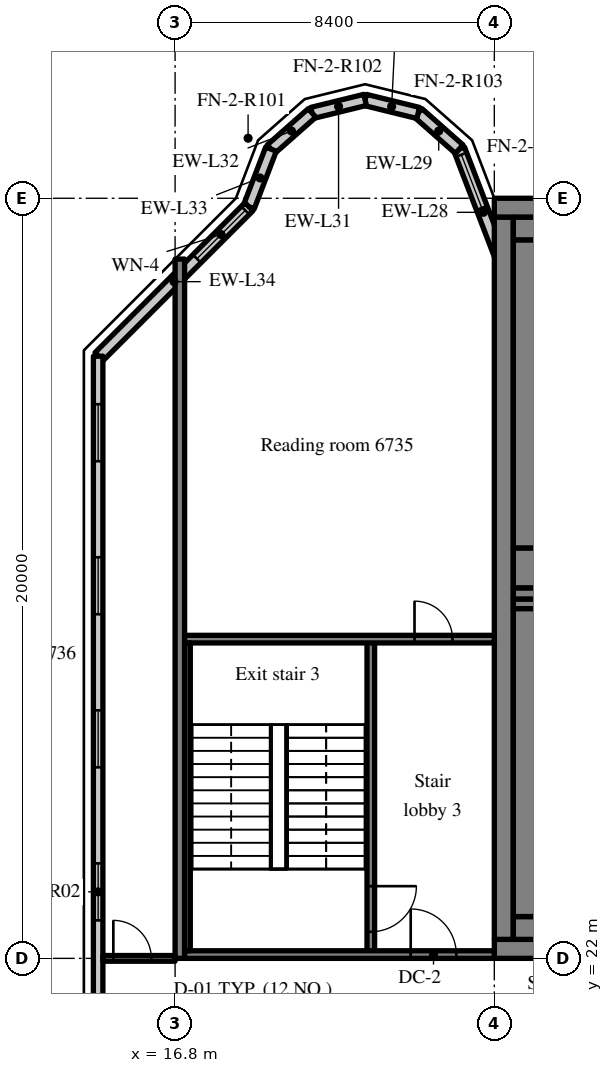
"""IFC4 building model, lengths in metres.
Left out: names, types, materials, properties, quantities, classifications, styles, units other than length and angle.
Written with IfcOpenShell. Run it as: python <this file> out.ifc"""

import sys

from ifc_helpers import new_model, si_unit, direction, frame, frame_2d, origin, place, context, subcontext, project, spatial, rectangle, extrude, source, transform, mapped, element, fill, save


model = new_model("IFC4")
c1 = context("Model", 3, precision=1e-05, world=origin(), true_north=direction((0.0, 1.0)))
c2 = subcontext(c1, "Body", "Model", "MODEL_VIEW")
j1 = project(units=[si_unit("LENGTHUNIT", "METRE"), si_unit("PLANEANGLEUNIT", "RADIAN")], contexts=[c1])
p1 = place(None, origin())
s1 = spatial("IfcSite", under=j1, at=p1, CompositionType="ELEMENT")
p2 = place(p1, origin())
s2 = spatial("IfcBuilding", under=s1, at=p2, CompositionType="ELEMENT")
p3 = place(p2, frame((0.0, 0.0, 281.7)))
s3 = spatial("IfcBuildingStorey", under=s2, at=p3, CompositionType="ELEMENT", Elevation=281.7)
m1 = source(origin(), c2, "Body", "SweptSolid", [
    extrude(rectangle(XDim=50.4, YDim=0.5, at=frame_2d((25.2, 0.0))), origin(), (0.0, 0.0, 1.0), 3.72),
])
p4 = place(p3, frame((25.2, 22.25, 0.0), z_axis=(0.0, 0.0, 1.0), x_axis=(1.0, 0.0, 0.0)))
e1 = element("IfcWall", 1, at=p4, inside=s3, PredefinedType="SHEAR", context=c2, shape_type="MappedRepresentation", body=[
    mapped(m1, transform((0.0, 0.0, 0.0), scale=1.0)),
])
m2 = source(origin(), c2, "Body", "SweptSolid", [
    extrude(rectangle(XDim=1.8, YDim=2.1, at=frame_2d((0.9, 1.05))), frame((0.0, 0.26, 0.0), z_axis=(0.0, -1.0, 0.0), x_axis=(1.0, 0.0, 0.0)), (0.0, 0.0, 1.0), 0.52),
])
p5 = place(p4, frame((15.9, 0.0, 0.0)))
e2 = element("IfcOpeningElement", 2, at=p5, cuts=e1, PredefinedType="OPENING", context=c2, shape_type="MappedRepresentation", body=[
    mapped(m2, transform((0.0, 0.0, 0.0), scale=1.0)),
])
m3 = source(origin(), c2, "Body", "SweptSolid", [
    extrude(rectangle(XDim=0.9, YDim=2.1, at=frame_2d((0.45, 1.05))), frame((0.0, 0.26, 0.0), z_axis=(0.0, -1.0, 0.0), x_axis=(1.0, 0.0, 0.0)), (0.0, 0.0, 1.0), 0.52),
])
p6 = place(p4, frame((21.525, 0.0, 0.0)))
e3 = element("IfcOpeningElement", 3, at=p6, cuts=e1, PredefinedType="OPENING", context=c2, shape_type="MappedRepresentation", body=[
    mapped(m3, transform((0.0, 0.0, 0.0), scale=1.0)),
])
p7 = place(p4, frame((32.7, 0.0, 0.0)))
e4 = element("IfcOpeningElement", 4, at=p7, cuts=e1, PredefinedType="OPENING", context=c2, shape_type="MappedRepresentation", body=[
    mapped(m2, transform((0.0, 0.0, 0.0), scale=1.0)),
])
m4 = source(origin(), c2, "Body", "SweptSolid", [
    extrude(rectangle(XDim=1.2, YDim=2.1, at=frame_2d((0.6, 1.05))), frame((0.0, 0.26, 0.0), z_axis=(0.0, -1.0, 0.0), x_axis=(1.0, 0.0, 0.0)), (0.0, 0.0, 1.0), 0.52),
])
p8 = place(p4, frame((6.5, 0.0, 0.0)))
e5 = element("IfcOpeningElement", 5, at=p8, cuts=e1, PredefinedType="OPENING", context=c2, shape_type="MappedRepresentation", body=[
    mapped(m4, transform((0.0, 0.0, 0.0), scale=1.0)),
])
p9 = place(p4, frame((47.975, 0.0, 0.0)))
e6 = element("IfcOpeningElement", 6, at=p9, cuts=e1, PredefinedType="OPENING", context=c2, shape_type="MappedRepresentation", body=[
    mapped(m4, transform((0.0, 0.0, 0.0), scale=1.0)),
])
p10 = place(p3, frame((25.2, 41.75, 0.0), z_axis=(0.0, 0.0, 1.0), x_axis=(1.0, 0.0, 0.0)))
e7 = element("IfcWall", 7, at=p10, inside=s3, PredefinedType="SHEAR", context=c2, shape_type="MappedRepresentation", body=[
    mapped(m1, transform((0.0, 0.0, 0.0), scale=1.0)),
])
m5 = source(origin(), c2, "Body", "SweptSolid", [
    extrude(rectangle(XDim=19.0, YDim=0.5, at=frame_2d((9.5, 0.0))), origin(), (0.0, 0.0, 1.0), 3.72),
])
p11 = place(p3, frame((25.45, 22.5, 0.0), z_axis=(0.0, 0.0, 1.0), x_axis=(0.0, 1.0, 0.0)))
e8 = element("IfcWall", 8, at=p11, inside=s3, PredefinedType="SHEAR", context=c2, shape_type="MappedRepresentation", body=[
    mapped(m5, transform((0.0, 0.0, 0.0), scale=1.0)),
])
m6 = source(origin(), c2, "Body", "SweptSolid", [
    extrude(rectangle(XDim=7.75, YDim=0.3, at=frame_2d((3.875, 0.0))), origin(), (0.0, 0.0, 1.0), 3.72),
])
p12 = place(p3, frame((25.7, 31.6, 0.0), z_axis=(0.0, 0.0, 1.0), x_axis=(1.0, 0.0, 0.0)))
e9 = element("IfcWall", 9, at=p12, inside=s3, PredefinedType="SHEAR", context=c2, shape_type="MappedRepresentation", body=[
    mapped(m6, transform((0.0, 0.0, 0.0), scale=1.0)),
])
m7 = source(origin(), c2, "Body", "SweptSolid", [
    extrude(rectangle(XDim=1.1, YDim=2.1, at=frame_2d((0.55, 1.05))), frame((0.0, 0.16, 0.0), z_axis=(0.0, -1.0, 0.0), x_axis=(1.0, 0.0, 0.0)), (0.0, 0.0, 1.0), 0.32),
])
p13 = place(p12, frame((6.05, 0.0, 0.0)))
e10 = element("IfcOpeningElement", 10, at=p13, cuts=e9, PredefinedType="OPENING", context=c2, shape_type="MappedRepresentation", body=[
    mapped(m7, transform((0.0, 0.0, 0.0), scale=1.0)),
])
m8 = source(origin(), c2, "Body", "SweptSolid", [
    extrude(rectangle(XDim=18.4, YDim=0.25, at=frame_2d((9.2, 0.0))), origin(), (0.0, 0.0, 1.0), 3.72),
])
p14 = place(p3, frame((16.925, 22.0, 0.0), z_axis=(0.0, 0.0, 1.0), x_axis=(0.0, 1.0, 0.0)))
e11 = element("IfcWall", 11, at=p14, inside=s3, PredefinedType="SHEAR", context=c2, shape_type="MappedRepresentation", body=[
    mapped(m8, transform((0.0, 0.0, 0.0), scale=1.0)),
])
m9 = source(origin(), c2, "Body", "SweptSolid", [
    extrude(rectangle(XDim=3.559, YDim=0.3, at=frame_2d((1.78, 0.0))), origin(), (0.0, 0.0, 1.0), 3.72),
])
p15 = place(p3, frame((25.55, 39.969, 0.0), z_axis=(0.0, 0.0, 1.0), x_axis=(-0.35779745313, 0.933799219604, 0.0)))
e12 = element("IfcWall", 12, at=p15, inside=s3, PredefinedType="SOLIDWALL", context=c2, shape_type="MappedRepresentation", body=[
    mapped(m9, transform((0.0, 0.0, 0.0), scale=1.0)),
])
m10 = source(origin(), c2, "Body", "SweptSolid", [
    extrude(rectangle(XDim=1.5, YDim=2.0, at=frame_2d((0.75, 1.0))), frame((0.0, 0.16, 0.0), z_axis=(0.0, -1.0, 0.0), x_axis=(1.0, 0.0, 0.0)), (0.0, 0.0, 1.0), 0.32),
])
p16 = place(p15, frame((1.903, 0.0, 0.9)))
e13 = element("IfcOpeningElement", 13, at=p16, cuts=e12, PredefinedType="OPENING", context=c2, shape_type="MappedRepresentation", body=[
    mapped(m10, transform((0.0, 0.0, 0.0), scale=1.0)),
])
m11 = source(origin(), c2, "Body", "SweptSolid", [
    extrude(rectangle(XDim=1.44, YDim=0.3, at=frame_2d((0.72, 0.0))), origin(), (0.0, 0.0, 1.0), 3.72),
])
p17 = place(p3, frame((24.277, 43.292, 0.0), z_axis=(0.0, 0.0, 1.0), x_axis=(-0.749649827867, 0.661834673902, 0.0)))
e14 = element("IfcWall", 14, at=p17, inside=s3, PredefinedType="SOLIDWALL", context=c2, shape_type="MappedRepresentation", body=[
    mapped(m11, transform((0.0, 0.0, 0.0), scale=1.0)),
])
m12 = source(origin(), c2, "Body", "SweptSolid", [
    extrude(rectangle(XDim=1.438, YDim=0.3, at=frame_2d((0.719, 0.0))), origin(), (0.0, 0.0, 1.0), 3.72),
])
p18 = place(p3, frame((23.197, 44.245, 0.0), z_axis=(0.0, 0.0, 1.0), x_axis=(-0.971152283879, 0.238460146601, 0.0)))
e15 = element("IfcWall", 15, at=p18, inside=s3, PredefinedType="SOLIDWALL", context=c2, shape_type="MappedRepresentation", body=[
    mapped(m12, transform((0.0, 0.0, 0.0), scale=1.0)),
])
m13 = source(origin(), c2, "Body", "SweptSolid", [
    extrude(rectangle(XDim=1.439, YDim=0.3, at=frame_2d((0.719, 0.0))), origin(), (0.0, 0.0, 1.0), 3.72),
])
p19 = place(p3, frame((21.8, 44.588, 0.0), z_axis=(0.0, 0.0, 1.0), x_axis=(-0.971161932466, -0.238420848351, 0.0)))
e16 = element("IfcWall", 16, at=p19, inside=s3, PredefinedType="SOLIDWALL", context=c2, shape_type="MappedRepresentation", body=[
    mapped(m13, transform((0.0, 0.0, 0.0), scale=1.0)),
])
m14 = source(origin(), c2, "Body", "SweptSolid", [
    extrude(rectangle(XDim=1.44, YDim=0.3, at=frame_2d((0.72, 0.0))), origin(), (0.0, 0.0, 1.0), 3.72),
])
p20 = place(p3, frame((20.403, 44.245, 0.0), z_axis=(0.0, 0.0, 1.0), x_axis=(-0.74957555648, -0.661918790432, 0.0)))
e17 = element("IfcWall", 17, at=p20, inside=s3, PredefinedType="SOLIDWALL", context=c2, shape_type="MappedRepresentation", body=[
    mapped(m14, transform((0.0, 0.0, 0.0), scale=1.0)),
])
m15 = source(origin(), c2, "Body", "SweptSolid", [
    extrude(rectangle(XDim=1.622, YDim=0.3, at=frame_2d((0.811, 0.0))), origin(), (0.0, 0.0, 1.0), 3.72),
])
p21 = place(p3, frame((19.323, 43.292, 0.0), z_axis=(0.0, 0.0, 1.0), x_axis=(-0.357778527068, -0.933806471154, 0.0)))
e18 = element("IfcWall", 18, at=p21, inside=s3, PredefinedType="SOLIDWALL", context=c2, shape_type="MappedRepresentation", body=[
    mapped(m15, transform((0.0, 0.0, 0.0), scale=1.0)),
])
m16 = source(origin(), c2, "Body", "SweptSolid", [
    extrude(rectangle(XDim=5.576, YDim=0.3, at=frame_2d((2.788, 0.0))), origin(), (0.0, 0.0, 1.0), 3.72),
])
p22 = place(p3, frame((18.743, 41.777, 0.0), z_axis=(0.0, 0.0, 1.0), x_axis=(-0.707106781187, -0.707106781187, 0.0)))
e19 = element("IfcWall", 19, at=p22, inside=s3, PredefinedType="SOLIDWALL", context=c2, shape_type="MappedRepresentation", body=[
    mapped(m16, transform((0.0, 0.0, 0.0), scale=1.0)),
])
m17 = source(origin(), c2, "Body", "SweptSolid", [
    extrude(rectangle(XDim=1.8, YDim=1.5, at=frame_2d((0.9, 0.75))), frame((0.0, 0.16, 0.0), z_axis=(0.0, -1.0, 0.0), x_axis=(1.0, 0.0, 0.0)), (0.0, 0.0, 1.0), 0.32),
])
p23 = place(p22, frame((0.135, 0.0, 0.9)))
e20 = element("IfcOpeningElement", 20, at=p23, cuts=e19, PredefinedType="OPENING", context=c2, shape_type="MappedRepresentation", body=[
    mapped(m17, transform((0.0, 0.0, 0.0), scale=1.0)),
])
m18 = source(origin(), c2, "Body", "SweptSolid", [
    extrude(rectangle(XDim=28.189, YDim=0.25, at=frame_2d((14.095, 0.0))), origin(), (0.0, 0.0, 1.0), 3.72),
])
p24 = place(p3, frame((14.775, 37.845, 0.0), z_axis=(0.0, 0.0, 1.0), x_axis=(0.0, -1.0, 0.0)))
e21 = element("IfcWall", 21, at=p24, inside=s3, PredefinedType="SOLIDWALL", context=c2, shape_type="MappedRepresentation", body=[
    mapped(m18, transform((0.0, 0.0, 0.0), scale=1.0)),
])
m19 = source(origin(), c2, "Body", "SweptSolid", [
    extrude(rectangle(XDim=1.5, YDim=1.5, at=frame_2d((0.75, 0.75))), frame((0.0, 0.135, 0.0), z_axis=(0.0, -1.0, 0.0), x_axis=(1.0, 0.0, 0.0)), (0.0, 0.0, 1.0), 0.27),
])
p25 = place(p24, frame((1.263, 0.0, 0.9)))
e22 = element("IfcOpeningElement", 22, at=p25, cuts=e21, PredefinedType="OPENING", context=c2, shape_type="MappedRepresentation", body=[
    mapped(m19, transform((0.0, 0.0, 0.0), scale=1.0)),
])
p26 = place(p24, frame((5.291, 0.0, 0.9)))
e23 = element("IfcOpeningElement", 23, at=p26, cuts=e21, PredefinedType="OPENING", context=c2, shape_type="MappedRepresentation", body=[
    mapped(m19, transform((0.0, 0.0, 0.0), scale=1.0)),
])
p27 = place(p24, frame((9.318, 0.0, 0.9)))
e24 = element("IfcOpeningElement", 24, at=p27, cuts=e21, PredefinedType="OPENING", context=c2, shape_type="MappedRepresentation", body=[
    mapped(m19, transform((0.0, 0.0, 0.0), scale=1.0)),
])
p28 = place(p24, frame((13.345, 0.0, 0.9)))
e25 = element("IfcOpeningElement", 25, at=p28, cuts=e21, PredefinedType="OPENING", context=c2, shape_type="MappedRepresentation", body=[
    mapped(m19, transform((0.0, 0.0, 0.0), scale=1.0)),
])
p29 = place(p24, frame((17.372, 0.0, 0.9)))
e26 = element("IfcOpeningElement", 26, at=p29, cuts=e21, PredefinedType="OPENING", context=c2, shape_type="MappedRepresentation", body=[
    mapped(m19, transform((0.0, 0.0, 0.0), scale=1.0)),
])
p30 = place(p24, frame((21.399, 0.0, 0.9)))
e27 = element("IfcOpeningElement", 27, at=p30, cuts=e21, PredefinedType="OPENING", context=c2, shape_type="MappedRepresentation", body=[
    mapped(m19, transform((0.0, 0.0, 0.0), scale=1.0)),
])
p31 = place(p24, frame((25.426, 0.0, 0.9)))
e28 = element("IfcOpeningElement", 28, at=p31, cuts=e21, PredefinedType="OPENING", context=c2, shape_type="MappedRepresentation", body=[
    mapped(m19, transform((0.0, 0.0, 0.0), scale=1.0)),
])
m20 = source(origin(), c2, "Body", "SweptSolid", [
    extrude(rectangle(XDim=8.3, YDim=0.2, at=frame_2d((4.15, 0.0))), origin(), (0.0, 0.0, 1.0), 3.72),
])
p32 = place(p3, frame((21.95, 22.1, 0.0), z_axis=(0.0, 0.0, 1.0), x_axis=(0.0, 1.0, 0.0)))
e29 = element("IfcWall", 29, at=p32, inside=s3, PredefinedType="SOLIDWALL", context=c2, shape_type="MappedRepresentation", body=[
    mapped(m20, transform((0.0, 0.0, 0.0), scale=1.0)),
])
m21 = source(origin(), c2, "Body", "SweptSolid", [
    extrude(rectangle(XDim=1.2, YDim=2.1, at=frame_2d((0.6, 1.05))), frame((0.0, 0.11, 0.0), z_axis=(0.0, -1.0, 0.0), x_axis=(1.0, 0.0, 0.0)), (0.0, 0.0, 1.0), 0.22),
])
p33 = place(p32, frame((0.6, 0.0, 0.0)))
e30 = element("IfcOpeningElement", 30, at=p33, cuts=e29, PredefinedType="OPENING", context=c2, shape_type="MappedRepresentation", body=[
    mapped(m21, transform((0.0, 0.0, 0.0), scale=1.0)),
])
m22 = source(origin(), c2, "Body", "SweptSolid", [
    extrude(rectangle(XDim=8.15, YDim=0.2, at=frame_2d((4.075, 0.0))), origin(), (0.0, 0.0, 1.0), 3.72),
])
p34 = place(p3, frame((17.05, 22.1, 0.0), z_axis=(0.0, 0.0, 1.0), x_axis=(1.0, 0.0, 0.0)))
e31 = element("IfcWall", 31, at=p34, inside=s3, PredefinedType="SOLIDWALL", context=c2, shape_type="MappedRepresentation", body=[
    mapped(m22, transform((0.0, 0.0, 0.0), scale=1.0)),
])
p35 = place(p34, frame((5.95, 0.0, 0.0)))
e32 = element("IfcOpeningElement", 32, at=p35, cuts=e31, PredefinedType="OPENING", context=c2, shape_type="MappedRepresentation", body=[
    mapped(m21, transform((0.0, 0.0, 0.0), scale=1.0)),
])
p36 = place(p3, frame((17.05, 30.4, 0.0), z_axis=(0.0, 0.0, 1.0), x_axis=(1.0, 0.0, 0.0)))
e33 = element("IfcWall", 33, at=p36, inside=s3, PredefinedType="SOLIDWALL", context=c2, shape_type="MappedRepresentation", body=[
    mapped(m22, transform((0.0, 0.0, 0.0), scale=1.0)),
])
m23 = source(origin(), c2, "Body", "SweptSolid", [
    extrude(rectangle(XDim=1.0, YDim=2.1, at=frame_2d((0.5, 1.05))), frame((0.0, 0.11, 0.0), z_axis=(0.0, -1.0, 0.0), x_axis=(1.0, 0.0, 0.0)), (0.0, 0.0, 1.0), 0.22),
])
p37 = place(p36, frame((6.05, 0.0, 0.0)))
e34 = element("IfcOpeningElement", 34, at=p37, cuts=e33, PredefinedType="OPENING", context=c2, shape_type="MappedRepresentation", body=[
    mapped(m23, transform((0.0, 0.0, 0.0), scale=1.0)),
])
m24 = source(origin(), c2, "Body", "SweptSolid", [
    extrude(rectangle(XDim=5.25, YDim=0.6, at=frame_2d((2.625, 0.0))), origin(), (0.0, 0.0, 1.0), 3.72),
])
p38 = place(p3, frame((25.7, 22.8, 0.0), z_axis=(0.0, 0.0, 1.0), x_axis=(1.0, 0.0, 0.0)))
e35 = element("IfcWall", 35, at=p38, inside=s3, PredefinedType="SOLIDWALL", context=c2, shape_type="MappedRepresentation", body=[
    mapped(m24, transform((0.0, 0.0, 0.0), scale=1.0)),
])
m25 = source(origin(), c2, "Body", "SweptSolid", [
    extrude(rectangle(XDim=5.25, YDim=0.25, at=frame_2d((2.625, 0.0))), origin(), (0.0, 0.0, 1.0), 3.72),
])
p39 = place(p3, frame((25.7, 31.325, 0.0), z_axis=(0.0, 0.0, 1.0), x_axis=(1.0, 0.0, 0.0)))
e36 = element("IfcWall", 36, at=p39, inside=s3, PredefinedType="SOLIDWALL", context=c2, shape_type="MappedRepresentation", body=[
    mapped(m25, transform((0.0, 0.0, 0.0), scale=1.0)),
])
m26 = source(origin(), c2, "Body", "SweptSolid", [
    extrude(rectangle(XDim=8.1, YDim=0.6, at=frame_2d((4.05, 0.0))), origin(), (0.0, 0.0, 1.0), 3.72),
])
p40 = place(p3, frame((26.0, 23.1, 0.0), z_axis=(0.0, 0.0, 1.0), x_axis=(0.0, 1.0, 0.0)))
e37 = element("IfcWall", 37, at=p40, inside=s3, PredefinedType="SOLIDWALL", context=c2, shape_type="MappedRepresentation", body=[
    mapped(m26, transform((0.0, 0.0, 0.0), scale=1.0)),
])
m27 = source(origin(), c2, "Body", "SweptSolid", [
    extrude(rectangle(XDim=8.1, YDim=0.15, at=frame_2d((4.05, 0.0))), origin(), (0.0, 0.0, 1.0), 3.72),
])
p41 = place(p3, frame((17.125, 22.2, 0.0), z_axis=(0.0, 0.0, 1.0), x_axis=(0.0, 1.0, 0.0)))
e38 = element("IfcWall", 38, at=p41, inside=s3, PredefinedType="SOLIDWALL", context=c2, shape_type="MappedRepresentation", body=[
    mapped(m27, transform((0.0, 0.0, 0.0), scale=1.0)),
])
p42 = place(p3, frame((25.7, 41.2, 0.0), z_axis=(0.0, 0.0, 1.0), x_axis=(1.0, 0.0, 0.0)))
e39 = element("IfcWall", 39, at=p42, inside=s3, PredefinedType="SOLIDWALL", context=c2, shape_type="MappedRepresentation", body=[
    mapped(m24, transform((0.0, 0.0, 0.0), scale=1.0)),
])
m28 = source(origin(), c2, "Body", "SweptSolid", [
    extrude(rectangle(XDim=5.25, YDim=1.05, at=frame_2d((2.625, 0.0))), origin(), (0.0, 0.0, 1.0), 3.72),
])
p43 = place(p3, frame((25.7, 32.275, 0.0), z_axis=(0.0, 0.0, 1.0), x_axis=(1.0, 0.0, 0.0)))
e40 = element("IfcWall", 40, at=p43, inside=s3, PredefinedType="SOLIDWALL", context=c2, shape_type="MappedRepresentation", body=[
    mapped(m28, transform((0.0, 0.0, 0.0), scale=1.0)),
])
p44 = place(p3, frame((26.0, 32.8, 0.0), z_axis=(0.0, 0.0, 1.0), x_axis=(0.0, 1.0, 0.0)))
e41 = element("IfcWall", 41, at=p44, inside=s3, PredefinedType="SOLIDWALL", context=c2, shape_type="MappedRepresentation", body=[
    mapped(m26, transform((0.0, 0.0, 0.0), scale=1.0)),
])
m29 = source(origin(), c2, "Body", "SweptSolid", [
    extrude(rectangle(XDim=1.9, YDim=0.15, at=frame_2d((0.95, 0.0))), origin(), (0.0, 0.0, 1.0), 3.02),
])
p45 = place(p3, frame((14.9, 22.0, 0.0), z_axis=(0.0, 0.0, 1.0), x_axis=(1.0, 0.0, 0.0)))
e42 = element("IfcWall", 42, at=p45, inside=s3, PredefinedType="PARTITIONING", context=c2, shape_type="MappedRepresentation", body=[
    mapped(m29, transform((0.0, 0.0, 0.0), scale=1.0)),
])
m30 = source(origin(), c2, "Body", "SweptSolid", [
    extrude(rectangle(XDim=1.0, YDim=2.1, at=frame_2d((0.5, 1.05))), frame((0.0, 0.085, 0.0), z_axis=(0.0, -1.0, 0.0), x_axis=(1.0, 0.0, 0.0)), (0.0, 0.0, 1.0), 0.17),
])
p46 = place(p45, frame((0.275, 0.0, 0.0)))
e43 = element("IfcOpeningElement", 43, at=p46, cuts=e42, PredefinedType="OPENING", context=c2, shape_type="MappedRepresentation", body=[
    mapped(m30, transform((0.0, 0.0, 0.0), scale=1.0)),
])
m31 = source(origin(), c2, "Body", "SweptSolid", [
    extrude(rectangle(XDim=1.5, YDim=2.0, at=frame_2d((0.75, 1.0))), frame((0.0, 0.03, 0.0), z_axis=(0.0, -1.0, 0.0), x_axis=(1.0, 0.0, 0.0)), (0.0, 0.0, 1.0), 0.06),
])
p47 = place(p16, origin())
e44 = element("IfcWindow", 44, at=p47, inside=s3, PartitioningType="SINGLE_PANEL", PredefinedType="WINDOW", context=c2, shape_type="MappedRepresentation", body=[
    mapped(m31, transform((0.0, 0.0, 0.0), scale=1.0)),
])
fill(e13, e44)
m32 = source(origin(), c2, "Body", "SweptSolid", [
    extrude(rectangle(XDim=1.8, YDim=1.5, at=frame_2d((0.9, 0.75))), frame((0.0, 0.03, 0.0), z_axis=(0.0, -1.0, 0.0), x_axis=(1.0, 0.0, 0.0)), (0.0, 0.0, 1.0), 0.06),
])
p48 = place(p23, origin())
e45 = element("IfcWindow", 45, at=p48, inside=s3, PartitioningType="SINGLE_PANEL", PredefinedType="WINDOW", context=c2, shape_type="MappedRepresentation", body=[
    mapped(m32, transform((0.0, 0.0, 0.0), scale=1.0)),
])
fill(e20, e45)
m33 = source(origin(), c2, "Body", "SweptSolid", [
    extrude(rectangle(XDim=1.5, YDim=1.5, at=frame_2d((0.75, 0.75))), frame((0.0, 0.03, 0.0), z_axis=(0.0, -1.0, 0.0), x_axis=(1.0, 0.0, 0.0)), (0.0, 0.0, 1.0), 0.06),
])
p49 = place(p25, origin())
e46 = element("IfcWindow", 46, at=p49, inside=s3, PartitioningType="SINGLE_PANEL", PredefinedType="WINDOW", context=c2, shape_type="MappedRepresentation", body=[
    mapped(m33, transform((0.0, 0.0, 0.0), scale=1.0)),
])
fill(e22, e46)
p50 = place(p26, origin())
e47 = element("IfcWindow", 47, at=p50, inside=s3, PartitioningType="SINGLE_PANEL", PredefinedType="WINDOW", context=c2, shape_type="MappedRepresentation", body=[
    mapped(m33, transform((0.0, 0.0, 0.0), scale=1.0)),
])
fill(e23, e47)
p51 = place(p27, origin())
e48 = element("IfcWindow", 48, at=p51, inside=s3, PartitioningType="SINGLE_PANEL", PredefinedType="WINDOW", context=c2, shape_type="MappedRepresentation", body=[
    mapped(m33, transform((0.0, 0.0, 0.0), scale=1.0)),
])
fill(e24, e48)
p52 = place(p28, origin())
e49 = element("IfcWindow", 49, at=p52, inside=s3, PartitioningType="SINGLE_PANEL", PredefinedType="WINDOW", context=c2, shape_type="MappedRepresentation", body=[
    mapped(m33, transform((0.0, 0.0, 0.0), scale=1.0)),
])
fill(e25, e49)
m34 = source(origin(), c2, "Body", "SweptSolid", [
    extrude(rectangle(XDim=1.2, YDim=2.1, at=frame_2d((0.6, 1.05))), frame((0.0, 0.025, 0.0), z_axis=(0.0, -1.0, 0.0), x_axis=(1.0, 0.0, 0.0)), (0.0, 0.0, 1.0), 0.05),
])
p53 = place(p33, origin())
e50 = element("IfcDoor", 50, at=p53, inside=s3, OperationType="SINGLE_SWING_RIGHT", PredefinedType="DOOR", context=c2, shape_type="MappedRepresentation", body=[
    mapped(m34, transform((0.0, 0.0, 0.0), scale=1.0)),
])
fill(e30, e50)
p54 = place(p35, origin())
e51 = element("IfcDoor", 51, at=p54, inside=s3, OperationType="SINGLE_SWING_LEFT", PredefinedType="DOOR", context=c2, shape_type="MappedRepresentation", body=[
    mapped(m34, transform((0.0, 0.0, 0.0), scale=1.0)),
])
fill(e32, e51)
m35 = source(origin(), c2, "Body", "SweptSolid", [
    extrude(rectangle(XDim=1.0, YDim=2.1, at=frame_2d((0.5, 1.05))), frame((0.0, 0.025, 0.0), z_axis=(0.0, -1.0, 0.0), x_axis=(1.0, 0.0, 0.0)), (0.0, 0.0, 1.0), 0.05),
])
p55 = place(p37, origin())
e52 = element("IfcDoor", 52, at=p55, inside=s3, OperationType="SINGLE_SWING_LEFT", PredefinedType="DOOR", context=c2, shape_type="MappedRepresentation", body=[
    mapped(m35, transform((0.0, 0.0, 0.0), scale=1.0)),
])
fill(e34, e52)
p56 = place(p46, origin())
e53 = element("IfcDoor", 53, at=p56, inside=s3, OperationType="SINGLE_SWING_LEFT", PredefinedType="DOOR", context=c2, shape_type="MappedRepresentation", body=[
    mapped(m35, transform((0.0, 0.0, 0.0), scale=1.0)),
])
fill(e43, e53)
save(model, sys.argv[1])
